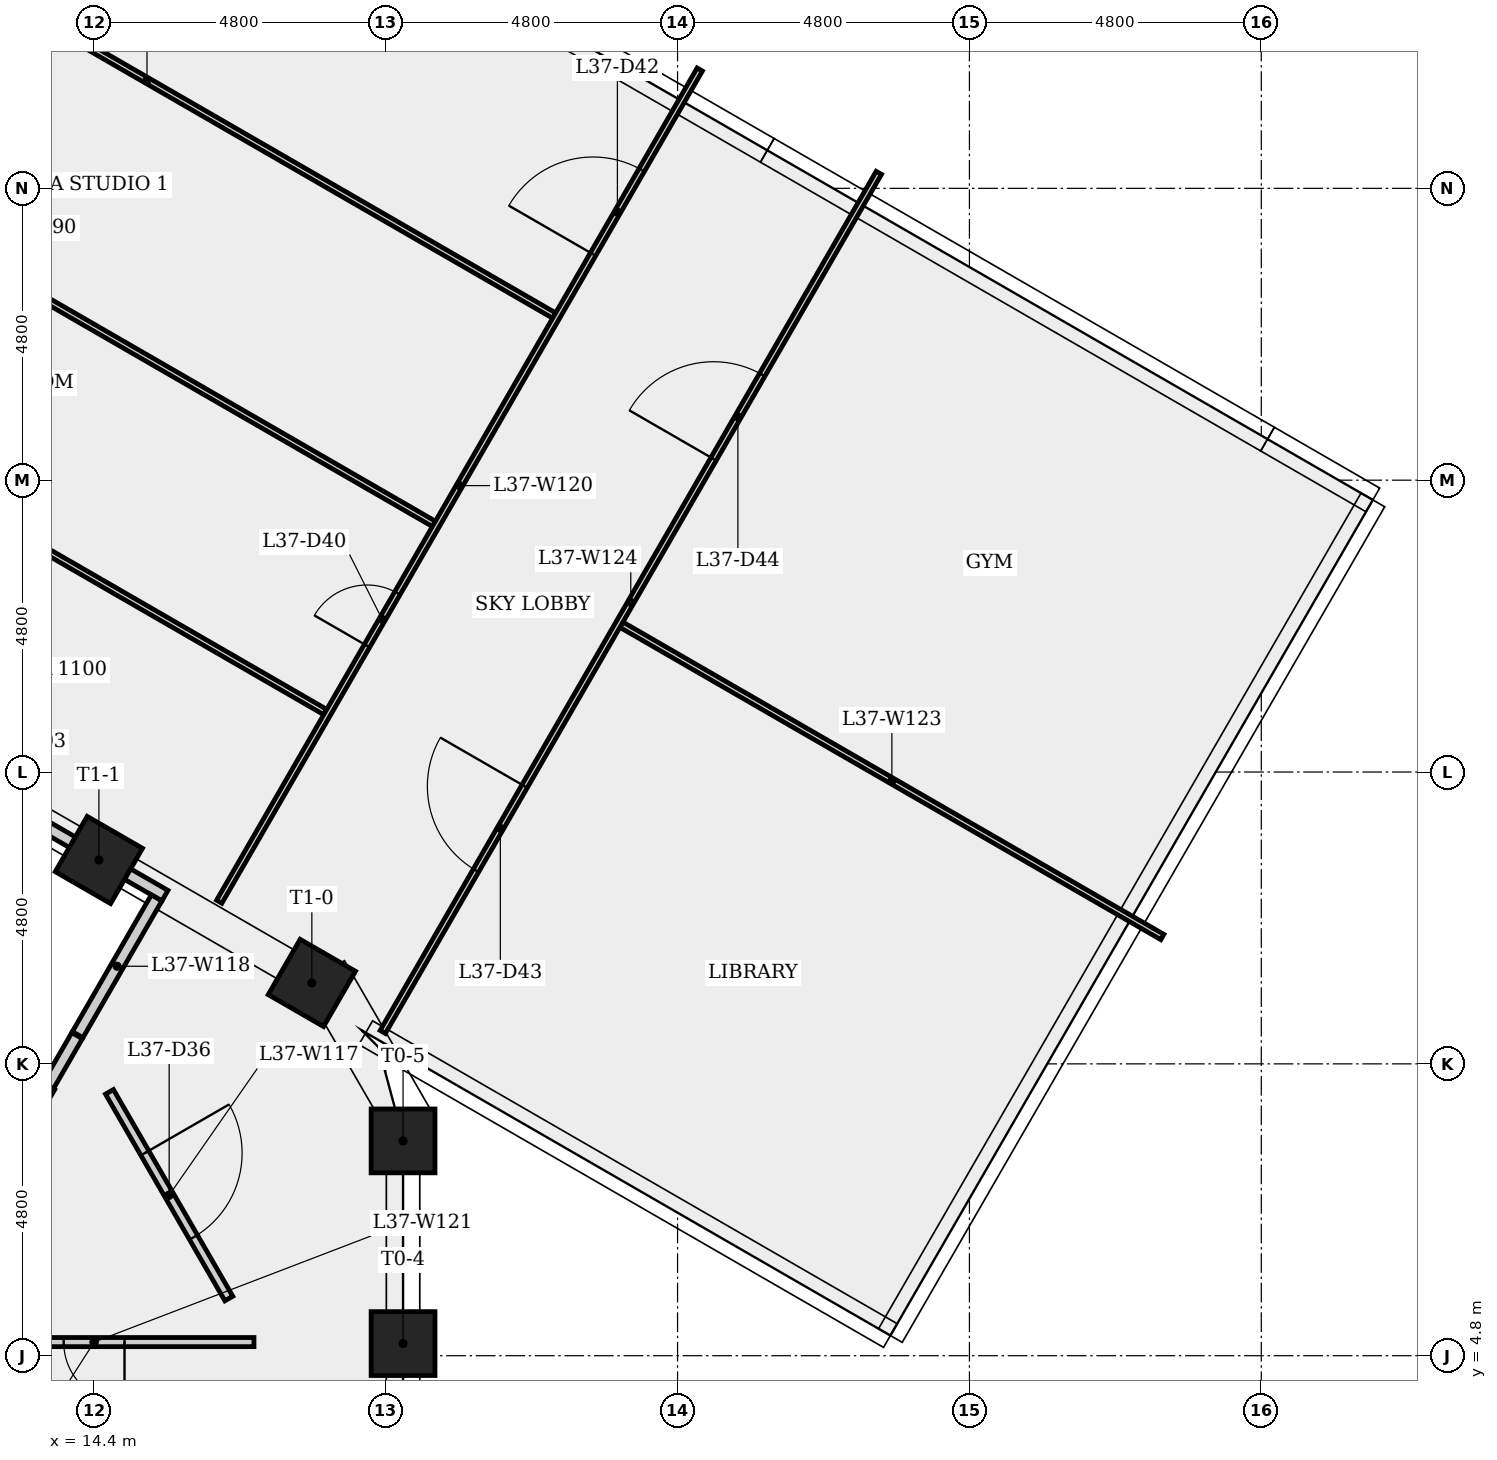
"""IFC4 building model, lengths in metres.
Left out: names, types, materials, properties, quantities, classifications, styles, units other than length and angle.
Written with IfcOpenShell. Run it as: python <this file> out.ifc"""

import sys

from ifc_helpers import new_model, si_unit, direction, frame, frame_2d, origin, origin_2d, place, context, subcontext, project, spatial, rectangle, extrude, element, fill, save


model = new_model("IFC4")
c1 = context("Model", 3, precision=1e-05, world=origin(), true_north=direction((0.0, 1.0)))
c2 = subcontext(c1, "Body", "Model", "MODEL_VIEW")
j1 = project(units=[si_unit("LENGTHUNIT", "METRE"), si_unit("PLANEANGLEUNIT", "RADIAN")], contexts=[c1])
p1 = place(None, origin())
s1 = spatial("IfcSite", under=j1, at=p1, CompositionType="ELEMENT")
p2 = place(p1, origin())
s2 = spatial("IfcBuilding", under=s1, at=p2, CompositionType="ELEMENT")
p3 = place(p2, frame((0.0, 0.0, 139.9)))
s3 = spatial("IfcBuildingStorey", under=s2, at=p3, CompositionType="ELEMENT", Elevation=139.9)
for number, where, z_axis, x_axis in (
    (1, (19.486, 5.0, 0.0), (0.0, 0.0, 1.0), (1.0, 0.0, 0.0)),
    (2, (19.486, 8.333, 0.0), (0.0, 0.0, 1.0), (1.0, 0.0, 0.0)),
    (3, (17.986, 10.931, 0.0), (0.0, 0.0, 1.0), (0.5, 0.866, 0.0)),
    (4, (14.483, 12.953, 0.0), (0.0, 0.0, 1.0), (0.5, 0.866, 0.0)),
):
    element("IfcColumn", number, at=place(p3, frame(where, z_axis=z_axis, x_axis=x_axis)), inside=s3, PredefinedType="COLUMN", context=c2, shape_type="SweptSolid", body=[
        extrude(rectangle(XDim=1.05, YDim=1.05, at=origin_2d()), origin(), (0.0, 0.0, 1.0), 4.0),
    ])
for number, where, z_axis, x_axis in (
    (5, (4.813, 23.119, 0.0), (0.0, 0.0, 1.0), (0.866, -0.5, 0.0)),
    (6, (6.6, 26.214, 0.0), (0.0, 0.0, 1.0), (0.866, -0.5, 0.0)),
):
    element("IfcWall", number, at=place(p3, frame(where, z_axis=z_axis, x_axis=x_axis)), inside=s3, PredefinedType="PARTITIONING", context=c2, shape_type="SweptSolid", body=[
        extrude(rectangle(XDim=15.465, YDim=0.1, at=frame_2d((7.732, 0.0))), origin(), (0.0, 0.0, 1.0), 3.6),
    ])
p4 = place(p3, frame((8.151, 12.268, 0.0), z_axis=(0.0, 0.0, 1.0), x_axis=(0.866025499775, -0.499999833739, 0.0)))
e7 = element("IfcWall", 7, at=p4, inside=s3, PredefinedType="SHEAR", context=c2, shape_type="SweptSolid", body=[
    extrude(rectangle(XDim=6.4, YDim=0.25, at=frame_2d((3.2, 0.0))), origin(), (0.0, 0.0, 1.0), 3.6),
])
p5 = place(p3, frame((8.578, 29.64, 0.0), z_axis=(0.0, 0.0, 1.0), x_axis=(0.866023378404, -0.500003508045, 0.0)))
e8 = element("IfcWall", 8, at=p5, inside=s3, PredefinedType="PARTITIONING", context=c2, shape_type="SweptSolid", body=[
    extrude(rectangle(XDim=15.465, YDim=0.1, at=frame_2d((7.732, 0.0))), origin(), (0.0, 0.0, 1.0), 3.6),
])
p6 = place(p3, frame((9.264, 16.006, 0.0), z_axis=(0.0, 0.0, 1.0), x_axis=(0.866032567898, -0.499987591186, 0.0)))
e9 = element("IfcWall", 9, at=p6, inside=s3, PredefinedType="PLUMBINGWALL", context=c2, shape_type="SweptSolid", body=[
    extrude(rectangle(XDim=7.28, YDim=0.2, at=frame_2d((3.64, 0.0))), origin(), (0.0, 0.0, 1.0), 2.725),
])
p7 = place(p3, frame((14.124, 10.064, 0.0), z_axis=(0.0, 0.0, 1.0), x_axis=(-0.4998334002, -0.86612156886, 0.0)))
e10 = element("IfcWall", 10, at=p7, inside=s3, PredefinedType="PLUMBINGWALL", context=c2, shape_type="SweptSolid", body=[
    extrude(rectangle(XDim=0.952, YDim=0.2, at=frame_2d((0.476, 0.0))), origin(), (0.0, 0.0, 1.0), 3.6),
])
p8 = place(p3, frame((14.657, 9.14, 0.0), z_axis=(0.0, 0.0, 1.0), x_axis=(0.500011323479, -0.866018866072, 0.0)))
e11 = element("IfcWall", 11, at=p8, inside=s3, PredefinedType="PARTITIONING", context=c2, shape_type="SweptSolid", body=[
    extrude(rectangle(XDim=3.926, YDim=0.15, at=frame_2d((1.963, 0.0))), origin(), (0.0, 0.0, 1.0), 3.6),
])
p9 = place(p8, frame((1.163, 0.0, 0.0)))
e12 = element("IfcOpeningElement", 12, at=p9, cuts=e11, PredefinedType="OPENING", context=c2, shape_type="SweptSolid", body=[
    extrude(rectangle(XDim=1.6, YDim=2.1, at=frame_2d((0.8, 1.05))), frame((0.0, 0.085, 0.0), z_axis=(0.0, -1.0, 0.0), x_axis=(1.0, 0.0, 0.0)), (0.0, 0.0, 1.0), 0.17),
])
p10 = place(p3, frame((15.432, 12.33, 0.0), z_axis=(0.0, 0.0, 1.0), x_axis=(-0.499961171201, -0.866047820441, 0.0)))
e13 = element("IfcWall", 13, at=p10, inside=s3, PredefinedType="PLUMBINGWALL", context=c2, shape_type="SweptSolid", body=[
    extrude(rectangle(XDim=2.597, YDim=0.2, at=frame_2d((1.298, 0.0))), origin(), (0.0, 0.0, 1.0), 3.6),
])
p11 = place(p3, frame((16.462, 12.267, 0.0), z_axis=(0.0, 0.0, 1.0), x_axis=(0.499991656573, 0.866030220811, 0.0)))
e14 = element("IfcWall", 14, at=p11, inside=s3, PredefinedType="PARTITIONING", context=c2, shape_type="SweptSolid", body=[
    extrude(rectangle(XDim=15.805, YDim=0.1, at=frame_2d((7.903, 0.0))), origin(), (0.0, 0.0, 1.0), 3.6),
])
p12 = place(p11, frame((4.861, 0.0, 0.0)))
e15 = element("IfcOpeningElement", 15, at=p12, cuts=e14, PredefinedType="OPENING", context=c2, shape_type="SweptSolid", body=[
    extrude(rectangle(XDim=1.0, YDim=2.1, at=frame_2d((0.5, 1.05))), frame((0.0, 0.06, 0.0), z_axis=(0.0, -1.0, 0.0), x_axis=(1.0, 0.0, 0.0)), (0.0, 0.0, 1.0), 0.12),
])
p13 = place(p11, frame((12.296, 0.0, 0.0)))
e16 = element("IfcOpeningElement", 16, at=p13, cuts=e14, PredefinedType="OPENING", context=c2, shape_type="SweptSolid", body=[
    extrude(rectangle(XDim=1.6, YDim=2.1, at=frame_2d((0.8, 1.05))), frame((0.0, 0.06, 0.0), z_axis=(0.0, -1.0, 0.0), x_axis=(1.0, 0.0, 0.0)), (0.0, 0.0, 1.0), 0.12),
])
p14 = place(p3, frame((17.034, 5.024, 0.0), z_axis=(0.0, 0.0, 1.0), x_axis=(-1.0, 0.0, 0.0)))
e17 = element("IfcWall", 17, at=p14, inside=s3, PredefinedType="PARTITIONING", context=c2, shape_type="SweptSolid", body=[
    extrude(rectangle(XDim=5.259, YDim=0.15, at=frame_2d((2.629, 0.0))), origin(), (0.0, 0.0, 1.0), 3.6),
])
p15 = place(p14, frame((2.129, 0.0, 0.0)))
e18 = element("IfcOpeningElement", 18, at=p15, cuts=e17, PredefinedType="OPENING", context=c2, shape_type="SweptSolid", body=[
    extrude(rectangle(XDim=1.0, YDim=2.1, at=frame_2d((0.5, 1.05))), frame((0.0, 0.085, 0.0), z_axis=(0.0, -1.0, 0.0), x_axis=(1.0, 0.0, 0.0)), (0.0, 0.0, 1.0), 0.17),
])
p16 = place(p3, frame((23.077, 16.823, 0.0), z_axis=(0.0, 0.0, 1.0), x_axis=(0.866026087725, -0.499998815378, 0.0)))
e19 = element("IfcWall", 19, at=p16, inside=s3, PredefinedType="PARTITIONING", context=c2, shape_type="SweptSolid", body=[
    extrude(rectangle(XDim=10.272, YDim=0.1, at=frame_2d((5.136, 0.0))), origin(), (0.0, 0.0, 1.0), 3.6),
])
p17 = place(p3, frame((19.152, 10.125, 0.0), z_axis=(0.0, 0.0, 1.0), x_axis=(0.500003095412, 0.86602361664, 0.0)))
e20 = element("IfcWall", 20, at=p17, inside=s3, PredefinedType="PARTITIONING", context=c2, shape_type="SweptSolid", body=[
    extrude(rectangle(XDim=16.316, YDim=0.1, at=frame_2d((8.158, 0.0))), origin(), (0.0, 0.0, 1.0), 3.6),
])
p18 = place(p17, frame((3.067, 0.0, 0.0)))
e21 = element("IfcOpeningElement", 21, at=p18, cuts=e20, PredefinedType="OPENING", context=c2, shape_type="SweptSolid", body=[
    extrude(rectangle(XDim=1.6, YDim=2.1, at=frame_2d((0.8, 1.05))), frame((0.0, 0.06, 0.0), z_axis=(0.0, -1.0, 0.0), x_axis=(1.0, 0.0, 0.0)), (0.0, 0.0, 1.0), 0.12),
])
p19 = place(p17, frame((10.882, 0.0, 0.0)))
e22 = element("IfcOpeningElement", 22, at=p19, cuts=e20, PredefinedType="OPENING", context=c2, shape_type="SweptSolid", body=[
    extrude(rectangle(XDim=1.6, YDim=2.1, at=frame_2d((0.8, 1.05))), frame((0.0, 0.06, 0.0), z_axis=(0.0, -1.0, 0.0), x_axis=(1.0, 0.0, 0.0)), (0.0, 0.0, 1.0), 0.12),
])
p20 = place(p15, origin())
e23 = element("IfcDoor", 23, at=p20, inside=s3, OperationType="SINGLE_SWING_LEFT", PredefinedType="DOOR", context=c2, shape_type="SweptSolid", body=[
    extrude(rectangle(XDim=1.0, YDim=2.1, at=frame_2d((0.5, 1.05))), frame((0.0, 0.025, 0.0), z_axis=(0.0, -1.0, 0.0), x_axis=(1.0, 0.0, 0.0)), (0.0, 0.0, 1.0), 0.05),
])
fill(e18, e23)
p21 = place(p9, origin())
e24 = element("IfcDoor", 24, at=p21, inside=s3, OperationType="SINGLE_SWING_LEFT", PredefinedType="DOOR", context=c2, shape_type="SweptSolid", body=[
    extrude(rectangle(XDim=1.6, YDim=2.1, at=frame_2d((0.8, 1.05))), frame((0.0, 0.025, 0.0), z_axis=(0.0, -1.0, 0.0), x_axis=(1.0, 0.0, 0.0)), (0.0, 0.0, 1.0), 0.05),
])
fill(e12, e24)
p22 = place(p12, origin())
e25 = element("IfcDoor", 25, at=p22, inside=s3, OperationType="SINGLE_SWING_LEFT", PredefinedType="DOOR", context=c2, shape_type="SweptSolid", body=[
    extrude(rectangle(XDim=1.0, YDim=2.1, at=frame_2d((0.5, 1.05))), frame((0.0, 0.025, 0.0), z_axis=(0.0, -1.0, 0.0), x_axis=(1.0, 0.0, 0.0)), (0.0, 0.0, 1.0), 0.05),
])
fill(e15, e25)
p23 = place(p13, origin())
e26 = element("IfcDoor", 26, at=p23, inside=s3, OperationType="SINGLE_SWING_LEFT", PredefinedType="DOOR", context=c2, shape_type="SweptSolid", body=[
    extrude(rectangle(XDim=1.6, YDim=2.1, at=frame_2d((0.8, 1.05))), frame((0.0, 0.025, 0.0), z_axis=(0.0, -1.0, 0.0), x_axis=(1.0, 0.0, 0.0)), (0.0, 0.0, 1.0), 0.05),
])
fill(e16, e26)
p24 = place(p18, origin())
e27 = element("IfcDoor", 27, at=p24, inside=s3, OperationType="SINGLE_SWING_RIGHT", PredefinedType="DOOR", context=c2, shape_type="SweptSolid", body=[
    extrude(rectangle(XDim=1.6, YDim=2.1, at=frame_2d((0.8, 1.05))), frame((0.0, 0.025, 0.0), z_axis=(0.0, -1.0, 0.0), x_axis=(1.0, 0.0, 0.0)), (0.0, 0.0, 1.0), 0.05),
])
fill(e21, e27)
p25 = place(p19, origin())
e28 = element("IfcDoor", 28, at=p25, inside=s3, OperationType="SINGLE_SWING_LEFT", PredefinedType="DOOR", context=c2, shape_type="SweptSolid", body=[
    extrude(rectangle(XDim=1.6, YDim=2.1, at=frame_2d((0.8, 1.05))), frame((0.0, 0.025, 0.0), z_axis=(0.0, -1.0, 0.0), x_axis=(1.0, 0.0, 0.0)), (0.0, 0.0, 1.0), 0.05),
])
fill(e22, e28)
save(model, sys.argv[1])
